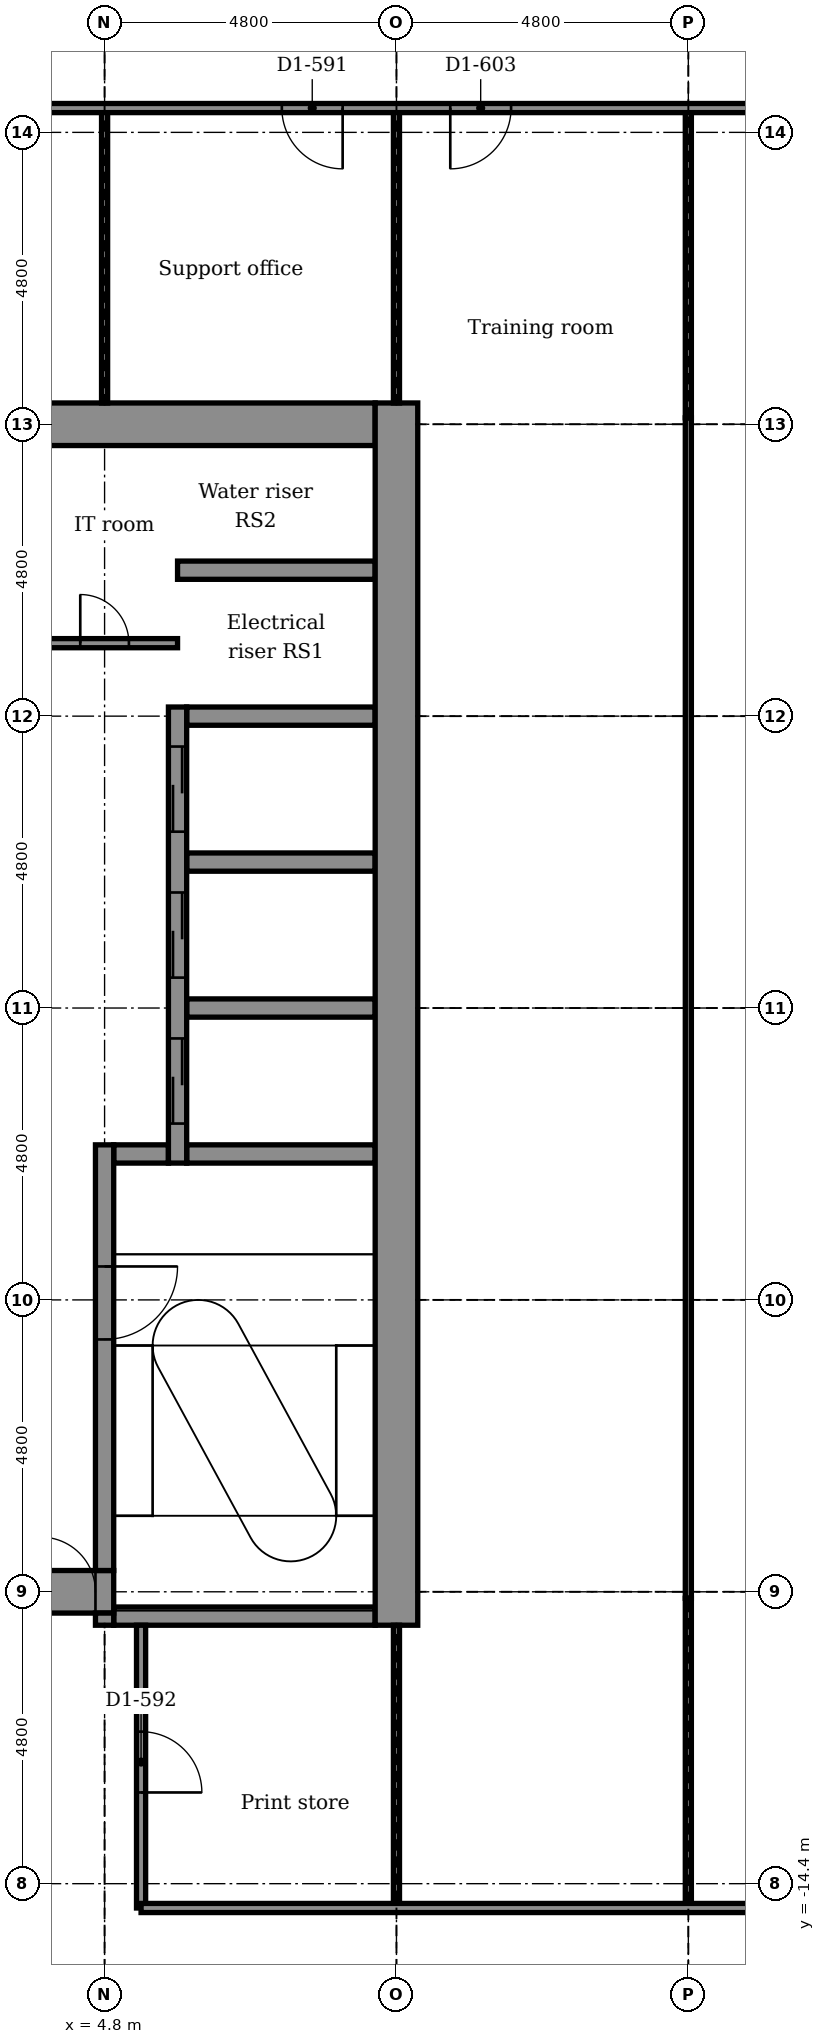
"""IFC4 building model, lengths in metres.
Left out: names, types, materials, properties, quantities, classifications, styles, units other than length and angle.
Written with IfcOpenShell. Run it as: python <this file> out.ifc"""

import sys

from ifc_helpers import new_model, si_unit, direction, frame, frame_2d, origin, place, context, subcontext, project, spatial, rectangle, extrude, element, fill, save


model = new_model("IFC4")
c1 = context("Model", 3, precision=1e-05, world=origin(), true_north=direction((0.0, 1.0)))
c2 = subcontext(c1, "Body", "Model", "MODEL_VIEW")
j1 = project(units=[si_unit("LENGTHUNIT", "METRE"), si_unit("PLANEANGLEUNIT", "RADIAN")], contexts=[c1])
p1 = place(None, origin())
s1 = spatial("IfcSite", under=j1, at=p1, CompositionType="ELEMENT")
p2 = place(p1, origin())
s2 = spatial("IfcBuilding", under=s1, at=p2, CompositionType="ELEMENT")
p3 = place(p2, frame((0.0, 0.0, 212.9)))
s3 = spatial("IfcBuildingStorey", under=s2, at=p3, CompositionType="ELEMENT", Elevation=212.9)
p4 = place(p3, frame((4.95, -10.0, -0.15), z_axis=(0.0, 0.0, 1.0), x_axis=(1.0, 0.0, 0.0)))
e1 = element("IfcWall", 1, at=p4, inside=s3, PredefinedType="STANDARD", context=c2, shape_type="SweptSolid", body=[
    extrude(rectangle(XDim=4.3, YDim=0.3, at=frame_2d((2.15, 0.0))), origin(), (0.0, 0.0, 1.0), 3.75),
])
p5 = place(p3, frame((-5.25, -9.6, -0.15), z_axis=(0.0, 0.0, 1.0), x_axis=(1.0, 0.0, 0.0)))
e2 = element("IfcWall", 2, at=p5, inside=s3, PredefinedType="SHEAR", context=c2, shape_type="SweptSolid", body=[
    extrude(rectangle(XDim=10.2, YDim=0.7, at=frame_2d((5.1, 0.0))), origin(), (0.0, 0.0, 1.0), 3.75),
])
p6 = place(p5, frame((9.0, 0.0, 0.15)))
e3 = element("IfcOpeningElement", 3, at=p6, cuts=e2, PredefinedType="OPENING", context=c2, shape_type="SweptSolid", body=[
    extrude(rectangle(XDim=0.9, YDim=2.1, at=frame_2d((0.45, 1.05))), frame((0.0, 0.36, 0.0), z_axis=(0.0, -1.0, 0.0), x_axis=(1.0, 0.0, 0.0)), (0.0, 0.0, 1.0), 0.72),
])
p7 = place(p3, frame((4.95, -2.4, -0.15), z_axis=(0.0, 0.0, 1.0), x_axis=(1.0, 0.0, 0.0)))
e4 = element("IfcWall", 4, at=p7, inside=s3, PredefinedType="STANDARD", context=c2, shape_type="SweptSolid", body=[
    extrude(rectangle(XDim=0.9, YDim=0.3, at=frame_2d((0.45, 0.0))), origin(), (0.0, 0.0, 1.0), 3.75),
])
for number, where, z_axis, x_axis in (
    (5, (6.15, -2.4, -0.15), (0.0, 0.0, 1.0), (1.0, 0.0, 0.0)),
    (6, (6.15, 0.0, -0.15), (0.0, 0.0, 1.0), (1.0, 0.0, 0.0)),
    (7, (6.15, 2.4, -0.15), (0.0, 0.0, 1.0), (1.0, 0.0, 0.0)),
    (8, (6.15, 4.8, -0.15), (0.0, 0.0, 1.0), (1.0, 0.0, 0.0)),
):
    element("IfcWall", number, at=place(p3, frame(where, z_axis=z_axis, x_axis=x_axis)), inside=s3, PredefinedType="STANDARD", context=c2, shape_type="SweptSolid", body=[
        extrude(rectangle(XDim=3.1, YDim=0.3, at=frame_2d((1.55, 0.0))), origin(), (0.0, 0.0, 1.0), 3.75),
    ])
p8 = place(p3, frame((6.0, 7.2, -0.15), z_axis=(0.0, 0.0, 1.0), x_axis=(1.0, 0.0, 0.0)))
e9 = element("IfcWall", 9, at=p8, inside=s3, PredefinedType="STANDARD", context=c2, shape_type="SweptSolid", body=[
    extrude(rectangle(XDim=3.25, YDim=0.3, at=frame_2d((1.625, 0.0))), origin(), (0.0, 0.0, 1.0), 3.75),
])
p9 = place(p3, frame((-5.25, 9.6, -0.15), z_axis=(0.0, 0.0, 1.0), x_axis=(1.0, 0.0, 0.0)))
e10 = element("IfcWall", 10, at=p9, inside=s3, PredefinedType="SHEAR", context=c2, shape_type="SweptSolid", body=[
    extrude(rectangle(XDim=14.5, YDim=0.7, at=frame_2d((7.25, 0.0))), origin(), (0.0, 0.0, 1.0), 3.75),
])
p10 = place(p9, frame((0.6, 0.0, 0.15)))
e11 = element("IfcOpeningElement", 11, at=p10, cuts=e10, PredefinedType="OPENING", context=c2, shape_type="SweptSolid", body=[
    extrude(rectangle(XDim=0.9, YDim=2.1, at=frame_2d((0.45, 1.05))), frame((0.0, 0.36, 0.0), z_axis=(0.0, -1.0, 0.0), x_axis=(1.0, 0.0, 0.0)), (0.0, 0.0, 1.0), 0.72),
])
p11 = place(p3, frame((4.8, -10.15, -0.15), z_axis=(0.0, 0.0, 1.0), x_axis=(0.0, 1.0, 0.0)))
e12 = element("IfcWall", 12, at=p11, inside=s3, PredefinedType="STANDARD", context=c2, shape_type="SweptSolid", body=[
    extrude(rectangle(XDim=0.2, YDim=0.3, at=frame_2d((0.1, 0.0))), origin(), (0.0, 0.0, 1.0), 3.75),
])
p12 = place(p3, frame((4.8, -9.25, -0.15), z_axis=(0.0, 0.0, 1.0), x_axis=(0.0, 1.0, 0.0)))
e13 = element("IfcWall", 13, at=p12, inside=s3, PredefinedType="STANDARD", context=c2, shape_type="SweptSolid", body=[
    extrude(rectangle(XDim=7.0, YDim=0.3, at=frame_2d((3.5, 0.0))), origin(), (0.0, 0.0, 1.0), 3.75),
])
p13 = place(p12, frame((3.8, 0.0, 0.15)))
e14 = element("IfcOpeningElement", 14, at=p13, cuts=e13, PredefinedType="OPENING", context=c2, shape_type="SweptSolid", body=[
    extrude(rectangle(XDim=1.2, YDim=2.1, at=frame_2d((0.6, 1.05))), frame((0.0, 0.16, 0.0), z_axis=(0.0, -1.0, 0.0), x_axis=(1.0, 0.0, 0.0)), (0.0, 0.0, 1.0), 0.32),
])
p14 = place(p3, frame((6.0, -2.55, -0.15), z_axis=(0.0, 0.0, 1.0), x_axis=(0.0, 1.0, 0.0)))
e15 = element("IfcWall", 15, at=p14, inside=s3, PredefinedType="STANDARD", context=c2, shape_type="SweptSolid", body=[
    extrude(rectangle(XDim=7.5, YDim=0.3, at=frame_2d((3.75, 0.0))), origin(), (0.0, 0.0, 1.0), 3.75),
])
p15 = place(p14, frame((0.65, 0.0, 0.15)))
e16 = element("IfcOpeningElement", 16, at=p15, cuts=e15, PredefinedType="OPENING", context=c2, shape_type="SweptSolid", body=[
    extrude(rectangle(XDim=1.4, YDim=2.1, at=frame_2d((0.7, 1.05))), frame((0.0, 0.16, 0.0), z_axis=(0.0, -1.0, 0.0), x_axis=(1.0, 0.0, 0.0)), (0.0, 0.0, 1.0), 0.32),
])
p16 = place(p14, frame((3.05, 0.0, 0.15)))
e17 = element("IfcOpeningElement", 17, at=p16, cuts=e15, PredefinedType="OPENING", context=c2, shape_type="SweptSolid", body=[
    extrude(rectangle(XDim=1.4, YDim=2.1, at=frame_2d((0.7, 1.05))), frame((0.0, 0.16, 0.0), z_axis=(0.0, -1.0, 0.0), x_axis=(1.0, 0.0, 0.0)), (0.0, 0.0, 1.0), 0.32),
])
p17 = place(p14, frame((5.45, 0.0, 0.15)))
e18 = element("IfcOpeningElement", 18, at=p17, cuts=e15, PredefinedType="OPENING", context=c2, shape_type="SweptSolid", body=[
    extrude(rectangle(XDim=1.4, YDim=2.1, at=frame_2d((0.7, 1.05))), frame((0.0, 0.16, 0.0), z_axis=(0.0, -1.0, 0.0), x_axis=(1.0, 0.0, 0.0)), (0.0, 0.0, 1.0), 0.32),
])
p18 = place(p3, frame((9.6, -10.15, -0.15), z_axis=(0.0, 0.0, 1.0), x_axis=(0.0, 1.0, 0.0)))
e19 = element("IfcWall", 19, at=p18, inside=s3, PredefinedType="SHEAR", context=c2, shape_type="SweptSolid", body=[
    extrude(rectangle(XDim=20.1, YDim=0.7, at=frame_2d((10.05, 0.0))), origin(), (0.0, 0.0, 1.0), 3.75),
])
p19 = place(p3, frame((14.4, -9.706, 0.0), z_axis=(0.0, 0.0, 1.0), x_axis=(0.0, 1.0, 0.0)))
e20 = element("IfcWall", 20, at=p19, inside=s3, PredefinedType="PARTITIONING", context=c2, shape_type="SweptSolid", body=[
    extrude(rectangle(XDim=19.412, YDim=0.1, at=frame_2d((9.706, 0.0))), origin(), (0.0, 0.0, 1.0), 3.6),
])
for number, where, z_axis, x_axis in (
    (21, (14.4, -14.8, 0.0), (0.0, 0.0, 1.0), (0.0, 1.0, 0.0)),
    (22, (14.4, 9.706, 0.0), (0.0, 0.0, 1.0), (0.0, 1.0, 0.0)),
):
    element("IfcWall", number, at=place(p3, frame(where, z_axis=z_axis, x_axis=x_axis)), inside=s3, PredefinedType="PARTITIONING", context=c2, shape_type="SweptSolid", body=[
        extrude(rectangle(XDim=5.094, YDim=0.1, at=frame_2d((2.547, 0.0))), origin(), (0.0, 0.0, 1.0), 2.916),
    ])
p20 = place(p3, frame((9.6, -14.8, 0.0), z_axis=(0.0, 0.0, 1.0), x_axis=(0.0, 1.0, 0.0)))
e23 = element("IfcWall", 23, at=p20, inside=s3, PredefinedType="PARTITIONING", context=c2, shape_type="SweptSolid", body=[
    extrude(rectangle(XDim=4.65, YDim=0.1, at=frame_2d((2.325, 0.0))), origin(), (0.0, 0.0, 1.0), 2.838),
])
p21 = place(p3, frame((9.6, 9.95, 0.0), z_axis=(0.0, 0.0, 1.0), x_axis=(0.0, 1.0, 0.0)))
e24 = element("IfcWall", 24, at=p21, inside=s3, PredefinedType="PARTITIONING", context=c2, shape_type="SweptSolid", body=[
    extrude(rectangle(XDim=4.85, YDim=0.1, at=frame_2d((2.425, 0.0))), origin(), (0.0, 0.0, 1.0), 2.838),
])
p22 = place(p3, frame((5.4, -14.8, 0.0), z_axis=(0.0, 0.0, 1.0), x_axis=(0.0, 1.0, 0.0)))
e25 = element("IfcWall", 25, at=p22, inside=s3, PredefinedType="PARTITIONING", context=c2, shape_type="SweptSolid", body=[
    extrude(rectangle(XDim=4.65, YDim=0.15, at=frame_2d((2.325, 0.0))), origin(), (0.0, 0.0, 1.0), 3.6),
])
p23 = place(p22, frame((1.9, 0.0, 0.0)))
e26 = element("IfcOpeningElement", 26, at=p23, cuts=e25, PredefinedType="OPENING", context=c2, shape_type="SweptSolid", body=[
    extrude(rectangle(XDim=1.0, YDim=2.1, at=frame_2d((0.5, 1.05))), frame((0.0, 0.085, 0.0), z_axis=(0.0, -1.0, 0.0), x_axis=(1.0, 0.0, 0.0)), (0.0, 0.0, 1.0), 0.17),
])
p24 = place(p3, frame((4.8, 9.95, 0.0), z_axis=(0.0, 0.0, 1.0), x_axis=(0.0, 1.0, 0.0)))
e27 = element("IfcWall", 27, at=p24, inside=s3, PredefinedType="PARTITIONING", context=c2, shape_type="SweptSolid", body=[
    extrude(rectangle(XDim=4.85, YDim=0.1, at=frame_2d((2.425, 0.0))), origin(), (0.0, 0.0, 1.0), 2.838),
])
p25 = place(p3, frame((5.4, -14.8, 0.0), z_axis=(0.0, 0.0, 1.0), x_axis=(1.0, 0.0, 0.0)))
e28 = element("IfcWall", 28, at=p25, inside=s3, PredefinedType="PARTITIONING", context=c2, shape_type="SweptSolid", body=[
    extrude(rectangle(XDim=12.985, YDim=0.15, at=frame_2d((6.492, 0.0))), origin(), (0.0, 0.0, 1.0), 3.6),
])
p26 = place(p25, frame((10.42, 0.0, 0.0)))
e29 = element("IfcOpeningElement", 29, at=p26, cuts=e28, PredefinedType="OPENING", context=c2, shape_type="SweptSolid", body=[
    extrude(rectangle(XDim=1.8, YDim=2.1, at=frame_2d((0.9, 1.05))), frame((0.0, 0.085, 0.0), z_axis=(0.0, -1.0, 0.0), x_axis=(1.0, 0.0, 0.0)), (0.0, 0.0, 1.0), 0.17),
])
p27 = place(p3, frame((3.75, 6.0, 0.0), z_axis=(0.0, 0.0, 1.0), x_axis=(1.0, 0.0, 0.0)))
e30 = element("IfcWall", 30, at=p27, inside=s3, PredefinedType="PARTITIONING", context=c2, shape_type="SweptSolid", body=[
    extrude(rectangle(XDim=2.25, YDim=0.15, at=frame_2d((1.125, 0.0))), origin(), (0.0, 0.0, 1.0), 3.6),
])
p28 = place(p27, frame((0.65, 0.0, 0.0)))
e31 = element("IfcOpeningElement", 31, at=p28, cuts=e30, PredefinedType="OPENING", context=c2, shape_type="SweptSolid", body=[
    extrude(rectangle(XDim=0.8, YDim=2.1, at=frame_2d((0.4, 1.05))), frame((0.0, 0.085, 0.0), z_axis=(0.0, -1.0, 0.0), x_axis=(1.0, 0.0, 0.0)), (0.0, 0.0, 1.0), 0.17),
])
p29 = place(p3, frame((-3.0, 14.8, 0.0), z_axis=(0.0, 0.0, 1.0), x_axis=(1.0, 0.0, 0.0)))
e32 = element("IfcWall", 32, at=p29, inside=s3, PredefinedType="PARTITIONING", context=c2, shape_type="SweptSolid", body=[
    extrude(rectangle(XDim=19.905, YDim=0.15, at=frame_2d((9.953, 0.0))), origin(), (0.0, 0.0, 1.0), 3.6),
])
p30 = place(p29, frame((4.95, 0.0, 0.0)))
e33 = element("IfcOpeningElement", 33, at=p30, cuts=e32, PredefinedType="OPENING", context=c2, shape_type="SweptSolid", body=[
    extrude(rectangle(XDim=0.9, YDim=2.1, at=frame_2d((0.45, 1.05))), frame((0.0, 0.085, 0.0), z_axis=(0.0, -1.0, 0.0), x_axis=(1.0, 0.0, 0.0)), (0.0, 0.0, 1.0), 0.17),
])
p31 = place(p29, frame((10.715, 0.0, 0.0)))
e34 = element("IfcOpeningElement", 34, at=p31, cuts=e32, PredefinedType="OPENING", context=c2, shape_type="SweptSolid", body=[
    extrude(rectangle(XDim=1.0, YDim=2.1, at=frame_2d((0.5, 1.05))), frame((0.0, 0.085, 0.0), z_axis=(0.0, -1.0, 0.0), x_axis=(1.0, 0.0, 0.0)), (0.0, 0.0, 1.0), 0.17),
])
p32 = place(p29, frame((13.485, 0.0, 0.0)))
e35 = element("IfcOpeningElement", 35, at=p32, cuts=e32, PredefinedType="OPENING", context=c2, shape_type="SweptSolid", body=[
    extrude(rectangle(XDim=1.0, YDim=2.1, at=frame_2d((0.5, 1.05))), frame((0.0, 0.085, 0.0), z_axis=(0.0, -1.0, 0.0), x_axis=(1.0, 0.0, 0.0)), (0.0, 0.0, 1.0), 0.17),
])
p33 = place(p28, origin())
e36 = element("IfcDoor", 36, at=p33, inside=s3, OperationType="SINGLE_SWING_LEFT", PredefinedType="DOOR", context=c2, shape_type="SweptSolid", body=[
    extrude(rectangle(XDim=0.8, YDim=2.1, at=frame_2d((0.4, 1.05))), frame((0.0, 0.025, 0.0), z_axis=(0.0, -1.0, 0.0), x_axis=(1.0, 0.0, 0.0)), (0.0, 0.0, 1.0), 0.05),
])
fill(e31, e36)
p34 = place(p31, frame((1.0, 0.0, 0.0), z_axis=(0.0, 0.0, 1.0), x_axis=(-1.0, 0.0, 0.0)))
e37 = element("IfcDoor", 37, at=p34, inside=s3, OperationType="SINGLE_SWING_RIGHT", PredefinedType="DOOR", context=c2, shape_type="SweptSolid", body=[
    extrude(rectangle(XDim=1.0, YDim=2.1, at=frame_2d((0.5, 1.05))), frame((0.0, 0.025, 0.0), z_axis=(0.0, -1.0, 0.0), x_axis=(1.0, 0.0, 0.0)), (0.0, 0.0, 1.0), 0.05),
])
fill(e34, e37)
p35 = place(p23, frame((1.0, 0.0, 0.0), z_axis=(0.0, 0.0, 1.0), x_axis=(-1.0, 0.0, 0.0)))
e38 = element("IfcDoor", 38, at=p35, inside=s3, OperationType="SINGLE_SWING_LEFT", PredefinedType="DOOR", context=c2, shape_type="SweptSolid", body=[
    extrude(rectangle(XDim=1.0, YDim=2.1, at=frame_2d((0.5, 1.05))), frame((0.0, 0.025, 0.0), z_axis=(0.0, -1.0, 0.0), x_axis=(1.0, 0.0, 0.0)), (0.0, 0.0, 1.0), 0.05),
])
fill(e26, e38)
p36 = place(p32, frame((1.0, 0.0, 0.0), z_axis=(0.0, 0.0, 1.0), x_axis=(-1.0, 0.0, 0.0)))
e39 = element("IfcDoor", 39, at=p36, inside=s3, OperationType="SINGLE_SWING_LEFT", PredefinedType="DOOR", context=c2, shape_type="SweptSolid", body=[
    extrude(rectangle(XDim=1.0, YDim=2.1, at=frame_2d((0.5, 1.05))), frame((0.0, 0.025, 0.0), z_axis=(0.0, -1.0, 0.0), x_axis=(1.0, 0.0, 0.0)), (0.0, 0.0, 1.0), 0.05),
])
fill(e35, e39)
p37 = place(p15, origin())
e40 = element("IfcDoor", 40, at=p37, inside=s3, OperationType="DOUBLE_DOOR_SLIDING", PredefinedType="DOOR", context=c2, shape_type="SweptSolid", body=[
    extrude(rectangle(XDim=1.4, YDim=2.1, at=frame_2d((0.7, 1.05))), frame((0.0, 0.025, 0.0), z_axis=(0.0, -1.0, 0.0), x_axis=(1.0, 0.0, 0.0)), (0.0, 0.0, 1.0), 0.05),
])
fill(e16, e40)
p38 = place(p16, origin())
e41 = element("IfcDoor", 41, at=p38, inside=s3, OperationType="DOUBLE_DOOR_SLIDING", PredefinedType="DOOR", context=c2, shape_type="SweptSolid", body=[
    extrude(rectangle(XDim=1.4, YDim=2.1, at=frame_2d((0.7, 1.05))), frame((0.0, 0.025, 0.0), z_axis=(0.0, -1.0, 0.0), x_axis=(1.0, 0.0, 0.0)), (0.0, 0.0, 1.0), 0.05),
])
fill(e17, e41)
p39 = place(p17, origin())
e42 = element("IfcDoor", 42, at=p39, inside=s3, OperationType="DOUBLE_DOOR_SLIDING", PredefinedType="DOOR", context=c2, shape_type="SweptSolid", body=[
    extrude(rectangle(XDim=1.4, YDim=2.1, at=frame_2d((0.7, 1.05))), frame((0.0, 0.025, 0.0), z_axis=(0.0, -1.0, 0.0), x_axis=(1.0, 0.0, 0.0)), (0.0, 0.0, 1.0), 0.05),
])
fill(e18, e42)
p40 = place(p13, frame((1.2, 0.0, 0.0), z_axis=(0.0, 0.0, 1.0), x_axis=(-1.0, 0.0, 0.0)))
e43 = element("IfcDoor", 43, at=p40, inside=s3, OperationType="SINGLE_SWING_RIGHT", PredefinedType="DOOR", context=c2, shape_type="SweptSolid", body=[
    extrude(rectangle(XDim=1.2, YDim=2.1, at=frame_2d((0.6, 1.05))), frame((0.0, 0.025, 0.0), z_axis=(0.0, -1.0, 0.0), x_axis=(1.0, 0.0, 0.0)), (0.0, 0.0, 1.0), 0.05),
])
fill(e14, e43)
p41 = place(p6, origin())
e44 = element("IfcDoor", 44, at=p41, inside=s3, OperationType="SINGLE_SWING_LEFT", PredefinedType="DOOR", context=c2, shape_type="SweptSolid", body=[
    extrude(rectangle(XDim=0.9, YDim=2.1, at=frame_2d((0.45, 1.05))), frame((0.0, 0.025, 0.0), z_axis=(0.0, -1.0, 0.0), x_axis=(1.0, 0.0, 0.0)), (0.0, 0.0, 1.0), 0.05),
])
fill(e3, e44)
save(model, sys.argv[1])
